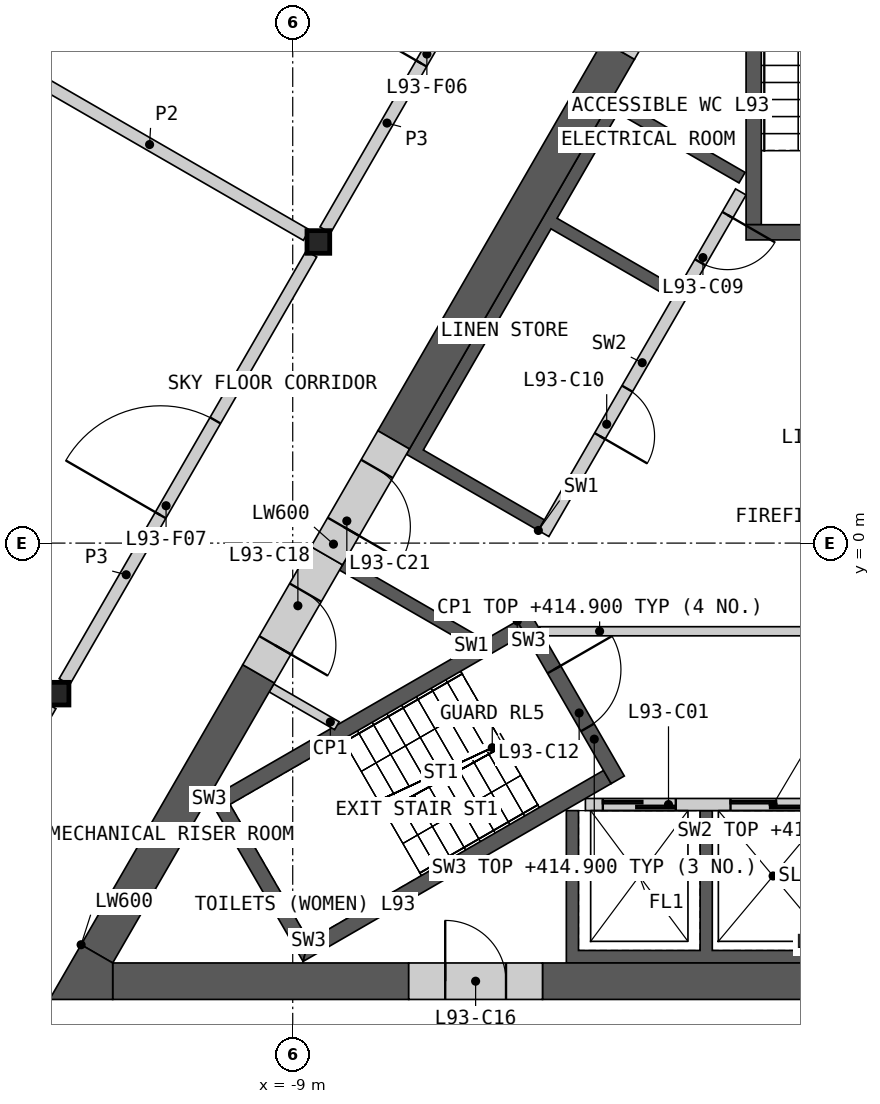
"""IFC4 building model, lengths in metres.
Left out: names, types, materials, properties, quantities, classifications, styles, units other than length and angle.
Written with IfcOpenShell. Run it as: python <this file> out.ifc"""

import sys

from ifc_helpers import new_model, si_unit, direction, frame, frame_2d, origin, origin_2d, place, context, subcontext, project, spatial, polyline, rectangle, i_section, outline, extrude, element, fill, save


model = new_model("IFC4")
c1 = context("Model", 3, precision=1e-05, world=origin(), true_north=direction((0.0, 1.0)))
c2 = subcontext(c1, "Body", "Model", "MODEL_VIEW")
j1 = project(units=[si_unit("LENGTHUNIT", "METRE"), si_unit("PLANEANGLEUNIT", "RADIAN")], contexts=[c1])
p1 = place(None, origin())
s1 = spatial("IfcSite", under=j1, at=p1, CompositionType="ELEMENT")
p2 = place(p1, origin())
s2 = spatial("IfcBuilding", under=s1, at=p2, CompositionType="ELEMENT")
p3 = place(p2, frame((0.0, 0.0, 405.2)))
s3 = spatial("IfcBuildingStorey", under=s2, at=p3, CompositionType="ELEMENT", Elevation=405.2)
for number, where, z_axis, x_axis in (
    (1, (-8.578, 4.953, 0.0), (0.0, 0.0, 1.0), (1.0, 0.0, 0.0)),
    (2, (-12.868, -2.476, 0.0), (0.0, 0.0, 1.0), (1.0, 0.0, 0.0)),
):
    element("IfcColumn", number, at=place(p3, frame(where, z_axis=z_axis, x_axis=x_axis)), inside=s3, PredefinedType="COLUMN", context=c2, shape_type="SweptSolid", body=[
        extrude(i_section(OverallWidth=0.374, OverallDepth=0.372, WebThickness=0.016, FlangeThickness=0.026, at=origin_2d()), origin(), (0.0, 0.0, 1.0), 10.0),
    ])
p4 = place(p3, origin())
e3 = element("IfcWall", 3, at=p4, inside=s3, PredefinedType="SHEAR", context=c2, shape_type="SweptSolid", body=[
    extrude(outline(polyline([(4.5, -4.4), (4.5, -6.906), (-4.5, -6.906), (-4.5, -4.4), (-4.3, -4.4), (-4.3, -6.7), (-2.3, -6.7), (-2.3, -4.4), (-2.1, -4.4), (-2.1, -6.7), (-0.1, -6.7), (-0.1, -4.4), (0.1, -4.4), (0.1, -6.7), (2.1, -6.7), (2.1, -4.4), (2.3, -4.4), (2.3, -6.7), (4.3, -6.7), (4.3, -4.4), (4.5, -4.4)])), origin(), (0.0, 0.0, 1.0), 9.7),
])
p5 = place(p3, frame((-4.187, -4.3, 0.0), z_axis=(0.0, 0.0, 1.0), x_axis=(1.0, 0.0, 0.0)))
e4 = element("IfcWall", 4, at=p5, inside=s3, PredefinedType="SOLIDWALL", context=c2, shape_type="SweptSolid", body=[
    extrude(rectangle(XDim=8.373, YDim=0.2, at=frame_2d((4.187, 0.0))), origin(), (0.0, 0.0, 1.0), 9.7),
])
p6 = place(p5, frame((0.287, 0.0, 0.0)))
e5 = element("IfcOpeningElement", 5, at=p6, cuts=e4, PredefinedType="OPENING", context=c2, shape_type="SweptSolid", body=[
    extrude(rectangle(XDim=1.2, YDim=2.1, at=frame_2d((0.6, 1.05))), frame((0.0, 0.11, 0.0), z_axis=(0.0, -1.0, 0.0), x_axis=(1.0, 0.0, 0.0)), (0.0, 0.0, 1.0), 0.22),
])
p7 = place(p5, frame((2.387, 0.0, 0.0)))
e6 = element("IfcOpeningElement", 6, at=p7, cuts=e4, PredefinedType="OPENING", context=c2, shape_type="SweptSolid", body=[
    extrude(rectangle(XDim=1.4, YDim=2.1, at=frame_2d((0.7, 1.05))), frame((0.0, 0.11, 0.0), z_axis=(0.0, -1.0, 0.0), x_axis=(1.0, 0.0, 0.0)), (0.0, 0.0, 1.0), 0.22),
])
p8 = place(p5, frame((4.737, 0.0, 0.0)))
e7 = element("IfcOpeningElement", 7, at=p8, cuts=e4, PredefinedType="OPENING", context=c2, shape_type="SweptSolid", body=[
    extrude(rectangle(XDim=1.1, YDim=2.1, at=frame_2d((0.55, 1.05))), frame((0.0, 0.11, 0.0), z_axis=(0.0, -1.0, 0.0), x_axis=(1.0, 0.0, 0.0)), (0.0, 0.0, 1.0), 0.22),
])
p9 = place(p5, frame((6.887, 0.0, 0.0)))
e8 = element("IfcOpeningElement", 8, at=p9, cuts=e4, PredefinedType="OPENING", context=c2, shape_type="SweptSolid", body=[
    extrude(rectangle(XDim=1.2, YDim=2.1, at=frame_2d((0.6, 1.05))), frame((0.0, 0.11, 0.0), z_axis=(0.0, -1.0, 0.0), x_axis=(1.0, 0.0, 0.0)), (0.0, 0.0, 1.0), 0.22),
])
p10 = place(p3, origin())
e9 = element("IfcWall", 9, at=p10, inside=s3, PredefinedType="SHEAR", context=c2, shape_type="SweptSolid", body=[
    extrude(outline(polyline([(-6.061, -1.697), (-8.231, -0.444), (-8.131, -0.271), (-5.96, -1.524), (-6.061, -1.697)])), origin(), (0.0, 0.0, 1.0), 9.7),
])
p11 = place(p3, origin())
e10 = element("IfcWall", 10, at=p11, inside=s3, PredefinedType="SHEAR", context=c2, shape_type="SweptSolid", body=[
    extrude(outline(polyline([(-4.96, 0.208), (-7.131, 1.461), (-3.731, 7.35), (-1.561, 6.097), (-1.66, 5.924), (-3.652, 7.074), (-4.652, 5.342), (-2.66, 4.192), (-2.76, 4.019), (-4.752, 5.169), (-6.852, 1.531), (-4.861, 0.381), (-4.96, 0.208)])), origin(), (0.0, 0.0, 1.0), 9.7),
])
p12 = place(p3, frame((-1.631, 5.776, 0.0), z_axis=(0.0, 0.0, 1.0), x_axis=(-0.499992876559, -0.866029516466, 0.0)))
e11 = element("IfcWall", 11, at=p12, inside=s3, PredefinedType="SOLIDWALL", context=c2, shape_type="SweptSolid", body=[
    extrude(rectangle(XDim=6.486, YDim=0.2, at=frame_2d((3.243, 0.0))), origin(), (0.0, 0.0, 1.0), 9.7),
])
p13 = place(p12, frame((0.437, 0.0, 0.0)))
e12 = element("IfcOpeningElement", 12, at=p13, cuts=e11, PredefinedType="OPENING", context=c2, shape_type="SweptSolid", body=[
    extrude(rectangle(XDim=0.9, YDim=2.1, at=frame_2d((0.45, 1.05))), frame((0.0, 0.11, 0.0), z_axis=(0.0, -1.0, 0.0), x_axis=(1.0, 0.0, 0.0)), (0.0, 0.0, 1.0), 0.22),
])
p14 = place(p12, frame((3.737, 0.0, 0.0)))
e13 = element("IfcOpeningElement", 13, at=p14, cuts=e11, PredefinedType="OPENING", context=c2, shape_type="SweptSolid", body=[
    extrude(rectangle(XDim=0.9, YDim=2.1, at=frame_2d((0.45, 1.05))), frame((0.0, 0.11, 0.0), z_axis=(0.0, -1.0, 0.0), x_axis=(1.0, 0.0, 0.0)), (0.0, 0.0, 1.0), 0.22),
])
p15 = place(p3, frame((-4.941, -1.45, 0.0), z_axis=(0.0, 0.0, 1.0), x_axis=(1.0, 0.0, 0.0)))
e14 = element("IfcWall", 14, at=p15, inside=s3, PredefinedType="PARTITIONING", context=c2, shape_type="SweptSolid", body=[
    extrude(rectangle(XDim=9.882, YDim=0.15, at=frame_2d((4.941, 0.0))), origin(), (0.0, 0.0, 1.0), 9.7),
])
p16 = place(p15, frame((4.391, 0.0, 0.0)))
e15 = element("IfcOpeningElement", 15, at=p16, cuts=e14, PredefinedType="OPENING", context=c2, shape_type="SweptSolid", body=[
    extrude(rectangle(XDim=1.1, YDim=2.1, at=frame_2d((0.55, 1.05))), frame((0.0, 0.085, 0.0), z_axis=(0.0, -1.0, 0.0), x_axis=(1.0, 0.0, 0.0)), (0.0, 0.0, 1.0), 0.17),
])
p17 = place(p3, origin())
e16 = element("IfcWall", 16, at=p17, inside=s3, PredefinedType="SHEAR", context=c2, shape_type="SweptSolid", body=[
    extrude(outline(polyline([(-5.307, -1.281), (-10.374, -4.206), (-10.032, -4.298), (-5.182, -1.498), (-5.307, -1.281)])), origin(), (0.0, 0.0, 1.0), 9.7),
])
p18 = place(p3, origin())
e17 = element("IfcWall", 17, at=p18, inside=s3, PredefinedType="SHEAR", context=c2, shape_type="SweptSolid", body=[
    extrude(outline(polyline([(-10.374, -4.206), (-8.83, -6.881), (-8.738, -6.539), (-10.032, -4.298), (-10.374, -4.206)])), origin(), (0.0, 0.0, 1.0), 9.7),
])
p19 = place(p3, origin())
e18 = element("IfcWall", 18, at=p19, inside=s3, PredefinedType="SHEAR", context=c2, shape_type="SweptSolid", body=[
    extrude(outline(polyline([(-8.738, -6.539), (-8.83, -6.881), (-3.763, -3.956), (-3.888, -3.739), (-8.738, -6.539)])), origin(), (0.0, 0.0, 1.0), 9.7),
])
p20 = place(p3, frame((-5.199, -1.219, 0.0), z_axis=(0.0, 0.0, 1.0), x_axis=(0.499982516597, -0.866035497597, 0.0)))
e19 = element("IfcWall", 19, at=p20, inside=s3, PredefinedType="SHEAR", context=c2, shape_type="SweptSolid", body=[
    extrude(rectangle(XDim=3.088, YDim=0.25, at=frame_2d((1.544, 0.0))), origin(), (0.0, 0.0, 1.0), 9.7),
])
p21 = place(p20, frame((0.994, 0.0, 0.0)))
e20 = element("IfcOpeningElement", 20, at=p21, cuts=e19, PredefinedType="OPENING", context=c2, shape_type="SweptSolid", body=[
    extrude(rectangle(XDim=1.1, YDim=2.1, at=frame_2d((0.55, 1.05))), frame((0.0, 0.135, 0.0), z_axis=(0.0, -1.0, 0.0), x_axis=(1.0, 0.0, 0.0)), (0.0, 0.0, 1.0), 0.27),
])
p22 = place(p3, origin())
e21 = element("IfcWall", 21, at=p22, inside=s3, PredefinedType="SHEAR", context=c2, shape_type="SweptSolid", body=[
    extrude(outline(polyline([(-1.294, 10.837), (-1.544, 11.087), (-1.544, 5.237), (-1.294, 5.237), (-1.294, 10.837)])), origin(), (0.0, 0.0, 1.0), 9.7),
])
p23 = place(p3, frame((1.544, 5.112, 0.0), z_axis=(0.0, 0.0, 1.0), x_axis=(-1.0, 0.0, 0.0)))
e22 = element("IfcWall", 22, at=p23, inside=s3, PredefinedType="SHEAR", context=c2, shape_type="SweptSolid", body=[
    extrude(rectangle(XDim=3.088, YDim=0.25, at=frame_2d((1.544, 0.0))), origin(), (0.0, 0.0, 1.0), 9.7),
])
p24 = place(p23, frame((0.994, 0.0, 0.0)))
e23 = element("IfcOpeningElement", 23, at=p24, cuts=e22, PredefinedType="OPENING", context=c2, shape_type="SweptSolid", body=[
    extrude(rectangle(XDim=1.1, YDim=2.1, at=frame_2d((0.55, 1.05))), frame((0.0, 0.135, 0.0), z_axis=(0.0, -1.0, 0.0), x_axis=(1.0, 0.0, 0.0)), (0.0, 0.0, 1.0), 0.27),
])
p25 = place(p3, frame((-9.35, -2.383, 0.0), z_axis=(0.0, 0.0, 1.0), x_axis=(0.866057962423, -0.499943602543, 0.0)))
e24 = element("IfcWall", 24, at=p25, inside=s3, PredefinedType="PARTITIONING", context=c2, shape_type="SweptSolid", body=[
    extrude(rectangle(XDim=1.242, YDim=0.15, at=frame_2d((0.621, 0.0))), origin(), (0.0, 0.0, 1.0), 9.7),
])
p26 = place(p3, frame((-4.892, -7.206, 0.0), z_axis=(0.0, 0.0, 1.0), x_axis=(1.0, 0.0, 0.0)))
e25 = element("IfcWall", 25, at=p26, inside=s3, PredefinedType="SHEAR", context=c2, shape_type="SweptSolid", body=[
    extrude(rectangle(XDim=14.261, YDim=0.6, at=frame_2d((7.13, 0.0))), origin(), (0.0, 0.0, 1.0), 9.7),
])
p27 = place(p3, frame((-11.961, -7.206, 0.0), z_axis=(0.0, 0.0, 1.0), x_axis=(1.0, 0.0, 0.0)))
e26 = element("IfcWall", 26, at=p27, inside=s3, PredefinedType="SHEAR", context=c2, shape_type="SweptSolid", body=[
    extrude(rectangle(XDim=4.868, YDim=0.6, at=frame_2d((2.434, 0.0))), origin(), (0.0, 0.0, 1.0), 9.7),
])
p28 = place(p3, frame((-3.639, 8.107, 0.0), z_axis=(0.0, 0.0, 1.0), x_axis=(-0.49999180351, -0.866030135978, 0.0)))
e27 = element("IfcWall", 27, at=p28, inside=s3, PredefinedType="SHEAR", context=c2, shape_type="SweptSolid", body=[
    extrude(rectangle(XDim=7.401, YDim=0.6, at=frame_2d((3.701, 0.0))), origin(), (0.0, 0.0, 1.0), 9.7),
])
p29 = place(p3, frame((-9.562, -2.15, 0.0), z_axis=(0.0, 0.0, 1.0), x_axis=(-0.500015214976, -0.866016619236, 0.0)))
e28 = element("IfcWall", 28, at=p29, inside=s3, PredefinedType="SHEAR", context=c2, shape_type="SweptSolid", body=[
    extrude(rectangle(XDim=5.318, YDim=0.6, at=frame_2d((2.659, 0.0))), origin(), (0.0, 0.0, 1.0), 9.7),
])
p30 = place(p3, origin())
e29 = element("IfcWall", 29, at=p30, inside=s3, PredefinedType="SHEAR", context=c2, shape_type="SweptSolid", body=[
    extrude(outline(polyline([(-12.48, -6.606), (-11.961, -6.906), (-11.961, -7.506), (-13.0, -7.506), (-12.48, -6.606)])), origin(), (0.0, 0.0, 1.0), 9.7),
])
p31 = place(p3, frame((-7.092, -7.206, 0.0), z_axis=(0.0, 0.0, 1.0), x_axis=(1.0, 0.0, 0.0)))
e30 = element("IfcWall", 30, at=p31, inside=s3, PredefinedType="SHEAR", context=c2, shape_type="SweptSolid", body=[
    extrude(rectangle(XDim=2.2, YDim=0.6, at=frame_2d((1.1, 0.0))), origin(), (0.0, 0.0, 1.0), 9.7),
])
p32 = place(p31, frame((0.6, 0.0, 0.0)))
e31 = element("IfcOpeningElement", 31, at=p32, cuts=e30, PredefinedType="OPENING", context=c2, shape_type="SweptSolid", body=[
    extrude(rectangle(XDim=1.0, YDim=2.1, at=frame_2d((0.5, 1.05))), frame((0.0, 0.31, 0.0), z_axis=(0.0, -1.0, 0.0), x_axis=(1.0, 0.0, 0.0)), (0.0, 0.0, 1.0), 0.62),
])
p33 = place(p3, frame((-8.44, -0.208, 0.0), z_axis=(0.0, 0.0, 1.0), x_axis=(-0.500001951578, -0.866024277037, 0.0)))
e32 = element("IfcWall", 32, at=p33, inside=s3, PredefinedType="SHEAR", context=c2, shape_type="SweptSolid", body=[
    extrude(rectangle(XDim=2.243, YDim=0.6, at=frame_2d((1.122, 0.0))), origin(), (0.0, 0.0, 1.0), 9.7),
])
p34 = place(p33, frame((0.7, 0.0, 0.0)))
e33 = element("IfcOpeningElement", 33, at=p34, cuts=e32, PredefinedType="OPENING", context=c2, shape_type="SweptSolid", body=[
    extrude(rectangle(XDim=1.0, YDim=2.1, at=frame_2d((0.5, 1.05))), frame((0.0, 0.31, 0.0), z_axis=(0.0, -1.0, 0.0), x_axis=(1.0, 0.0, 0.0)), (0.0, 0.0, 1.0), 0.62),
])
p35 = place(p3, frame((-2.539, 10.013, 0.0), z_axis=(0.0, 0.0, 1.0), x_axis=(-0.50002983664, -0.866008176907, 0.0)))
e34 = element("IfcWall", 34, at=p35, inside=s3, PredefinedType="SHEAR", context=c2, shape_type="SweptSolid", body=[
    extrude(rectangle(XDim=2.2, YDim=0.6, at=frame_2d((1.1, 0.0))), origin(), (0.0, 0.0, 1.0), 9.7),
])
p36 = place(p35, frame((0.6, 0.0, 0.0)))
e35 = element("IfcOpeningElement", 35, at=p36, cuts=e34, PredefinedType="OPENING", context=c2, shape_type="SweptSolid", body=[
    extrude(rectangle(XDim=1.0, YDim=2.1, at=frame_2d((0.5, 1.05))), frame((0.0, 0.31, 0.0), z_axis=(0.0, -1.0, 0.0), x_axis=(1.0, 0.0, 0.0)), (0.0, 0.0, 1.0), 0.62),
])
p37 = place(p3, frame((-7.34, 1.698, 0.0), z_axis=(0.0, 0.0, 1.0), x_axis=(-0.50002983664, -0.866008176907, 0.0)))
e36 = element("IfcWall", 36, at=p37, inside=s3, PredefinedType="SHEAR", context=c2, shape_type="SweptSolid", body=[
    extrude(rectangle(XDim=2.2, YDim=0.6, at=frame_2d((1.1, 0.0))), origin(), (0.0, 0.0, 1.0), 9.7),
])
p38 = place(p37, frame((0.55, 0.0, 0.0)))
e37 = element("IfcOpeningElement", 37, at=p38, cuts=e36, PredefinedType="OPENING", context=c2, shape_type="SweptSolid", body=[
    extrude(rectangle(XDim=1.1, YDim=2.1, at=frame_2d((0.55, 1.05))), frame((0.0, 0.31, 0.0), z_axis=(0.0, -1.0, 0.0), x_axis=(1.0, 0.0, 0.0)), (0.0, 0.0, 1.0), 0.62),
])
p39 = place(p3, frame((-8.465, 5.15, 0.0), z_axis=(0.0, 0.0, 1.0), x_axis=(0.499992155518, 0.866029932751, 0.0)))
e38 = element("IfcWall", 38, at=p39, inside=s3, PredefinedType="PARTITIONING", context=c2, shape_type="SweptSolid", body=[
    extrude(rectangle(XDim=8.123, YDim=0.2, at=frame_2d((4.062, 0.0))), origin(), (0.0, 0.0, 1.0), 9.7),
])
p40 = place(p39, frame((3.162, 0.0, 0.0)))
e39 = element("IfcOpeningElement", 39, at=p40, cuts=e38, PredefinedType="OPENING", context=c2, shape_type="SweptSolid", body=[
    extrude(rectangle(XDim=1.8, YDim=2.1, at=frame_2d((0.9, 1.05))), frame((0.0, 0.11, 0.0), z_axis=(0.0, -1.0, 0.0), x_axis=(1.0, 0.0, 0.0)), (0.0, 0.0, 1.0), 0.22),
])
p41 = place(p3, frame((-12.754, -2.279, 0.0), z_axis=(0.0, 0.0, 1.0), x_axis=(0.500001682468, 0.866024432409, 0.0)))
e40 = element("IfcWall", 40, at=p41, inside=s3, PredefinedType="PARTITIONING", context=c2, shape_type="SweptSolid", body=[
    extrude(rectangle(XDim=8.124, YDim=0.2, at=frame_2d((4.062, 0.0))), origin(), (0.0, 0.0, 1.0), 9.7),
])
p42 = place(p41, frame((3.162, 0.0, 0.0)))
e41 = element("IfcOpeningElement", 41, at=p42, cuts=e40, PredefinedType="OPENING", context=c2, shape_type="SweptSolid", body=[
    extrude(rectangle(XDim=1.8, YDim=2.1, at=frame_2d((0.9, 1.05))), frame((0.0, 0.11, 0.0), z_axis=(0.0, -1.0, 0.0), x_axis=(1.0, 0.0, 0.0)), (0.0, 0.0, 1.0), 0.22),
])
p43 = place(p3, frame((-15.244, -6.592, 0.0), z_axis=(0.0, 0.0, 1.0), x_axis=(0.499974648164, 0.866040040179, 0.0)))
e42 = element("IfcWall", 42, at=p43, inside=s3, PredefinedType="PARTITIONING", context=c2, shape_type="SweptSolid", body=[
    extrude(rectangle(XDim=4.525, YDim=0.2, at=frame_2d((2.263, 0.0))), origin(), (0.0, 0.0, 1.0), 9.7),
])
p44 = place(p3, frame((-13.933, 8.044, 0.0), z_axis=(0.0, 0.0, 1.0), x_axis=(0.866024464444, -0.500001626982, 0.0)))
e43 = element("IfcWall", 43, at=p44, inside=s3, PredefinedType="PARTITIONING", context=c2, shape_type="SweptSolid", body=[
    extrude(rectangle(XDim=5.955, YDim=0.2, at=frame_2d((2.978, 0.0))), origin(), (0.0, 0.0, 1.0), 8.93),
])
p45 = place(p6, origin())
e44 = element("IfcDoor", 44, at=p45, inside=s3, OperationType="SLIDING_TO_LEFT", PredefinedType="DOOR", context=c2, shape_type="SweptSolid", body=[
    extrude(rectangle(XDim=1.2, YDim=2.1, at=frame_2d((0.6, 1.05))), frame((0.0, 0.025, 0.0), z_axis=(0.0, -1.0, 0.0), x_axis=(1.0, 0.0, 0.0)), (0.0, 0.0, 1.0), 0.05),
])
fill(e5, e44)
p46 = place(p7, origin())
e45 = element("IfcDoor", 45, at=p46, inside=s3, OperationType="SLIDING_TO_LEFT", PredefinedType="DOOR", context=c2, shape_type="SweptSolid", body=[
    extrude(rectangle(XDim=1.4, YDim=2.1, at=frame_2d((0.7, 1.05))), frame((0.0, 0.025, 0.0), z_axis=(0.0, -1.0, 0.0), x_axis=(1.0, 0.0, 0.0)), (0.0, 0.0, 1.0), 0.05),
])
fill(e6, e45)
p47 = place(p13, origin())
e46 = element("IfcDoor", 46, at=p47, inside=s3, OperationType="SINGLE_SWING_LEFT", PredefinedType="DOOR", context=c2, shape_type="SweptSolid", body=[
    extrude(rectangle(XDim=0.9, YDim=2.1, at=frame_2d((0.45, 1.05))), frame((0.0, 0.025, 0.0), z_axis=(0.0, -1.0, 0.0), x_axis=(1.0, 0.0, 0.0)), (0.0, 0.0, 1.0), 0.05),
])
fill(e12, e46)
p48 = place(p14, origin())
e47 = element("IfcDoor", 47, at=p48, inside=s3, OperationType="SINGLE_SWING_RIGHT", PredefinedType="DOOR", context=c2, shape_type="SweptSolid", body=[
    extrude(rectangle(XDim=0.9, YDim=2.1, at=frame_2d((0.45, 1.05))), frame((0.0, 0.025, 0.0), z_axis=(0.0, -1.0, 0.0), x_axis=(1.0, 0.0, 0.0)), (0.0, 0.0, 1.0), 0.05),
])
fill(e13, e47)
p49 = place(p21, origin())
e48 = element("IfcDoor", 48, at=p49, inside=s3, OperationType="SINGLE_SWING_LEFT", PredefinedType="DOOR", context=c2, shape_type="SweptSolid", body=[
    extrude(rectangle(XDim=1.1, YDim=2.1, at=frame_2d((0.55, 1.05))), frame((0.0, 0.025, 0.0), z_axis=(0.0, -1.0, 0.0), x_axis=(1.0, 0.0, 0.0)), (0.0, 0.0, 1.0), 0.05),
])
fill(e20, e48)
p50 = place(p32, origin())
e49 = element("IfcDoor", 49, at=p50, inside=s3, OperationType="SINGLE_SWING_LEFT", PredefinedType="DOOR", context=c2, shape_type="SweptSolid", body=[
    extrude(rectangle(XDim=1.0, YDim=2.1, at=frame_2d((0.5, 1.05))), frame((0.0, 0.055, 0.0), z_axis=(0.0, -1.0, 0.0), x_axis=(1.0, 0.0, 0.0)), (0.0, 0.0, 1.0), 0.05),
])
fill(e31, e49)
p51 = place(p34, origin())
e50 = element("IfcDoor", 50, at=p51, inside=s3, OperationType="SINGLE_SWING_RIGHT", PredefinedType="DOOR", context=c2, shape_type="SweptSolid", body=[
    extrude(rectangle(XDim=1.0, YDim=2.1, at=frame_2d((0.5, 1.05))), frame((0.0, 0.055, 0.0), z_axis=(0.0, -1.0, 0.0), x_axis=(1.0, 0.0, 0.0)), (0.0, 0.0, 1.0), 0.05),
])
fill(e33, e50)
p52 = place(p38, origin())
e51 = element("IfcDoor", 51, at=p52, inside=s3, OperationType="SINGLE_SWING_RIGHT", PredefinedType="DOOR", context=c2, shape_type="SweptSolid", body=[
    extrude(rectangle(XDim=1.1, YDim=2.1, at=frame_2d((0.55, 1.05))), frame((0.0, 0.055, 0.0), z_axis=(0.0, -1.0, 0.0), x_axis=(1.0, 0.0, 0.0)), (0.0, 0.0, 1.0), 0.05),
])
fill(e37, e51)
p53 = place(p40, origin())
e52 = element("IfcDoor", 52, at=p53, inside=s3, OperationType="DOUBLE_DOOR_SINGLE_SWING", PredefinedType="DOOR", context=c2, shape_type="SweptSolid", body=[
    extrude(rectangle(XDim=1.8, YDim=2.1, at=frame_2d((0.9, 1.05))), frame((0.0, 0.025, 0.0), z_axis=(0.0, -1.0, 0.0), x_axis=(1.0, 0.0, 0.0)), (0.0, 0.0, 1.0), 0.05),
])
fill(e39, e52)
p54 = place(p42, origin())
e53 = element("IfcDoor", 53, at=p54, inside=s3, OperationType="DOUBLE_DOOR_SINGLE_SWING", PredefinedType="DOOR", context=c2, shape_type="SweptSolid", body=[
    extrude(rectangle(XDim=1.8, YDim=2.1, at=frame_2d((0.9, 1.05))), frame((0.0, 0.025, 0.0), z_axis=(0.0, -1.0, 0.0), x_axis=(1.0, 0.0, 0.0)), (0.0, 0.0, 1.0), 0.05),
])
fill(e41, e53)
save(model, sys.argv[1])
